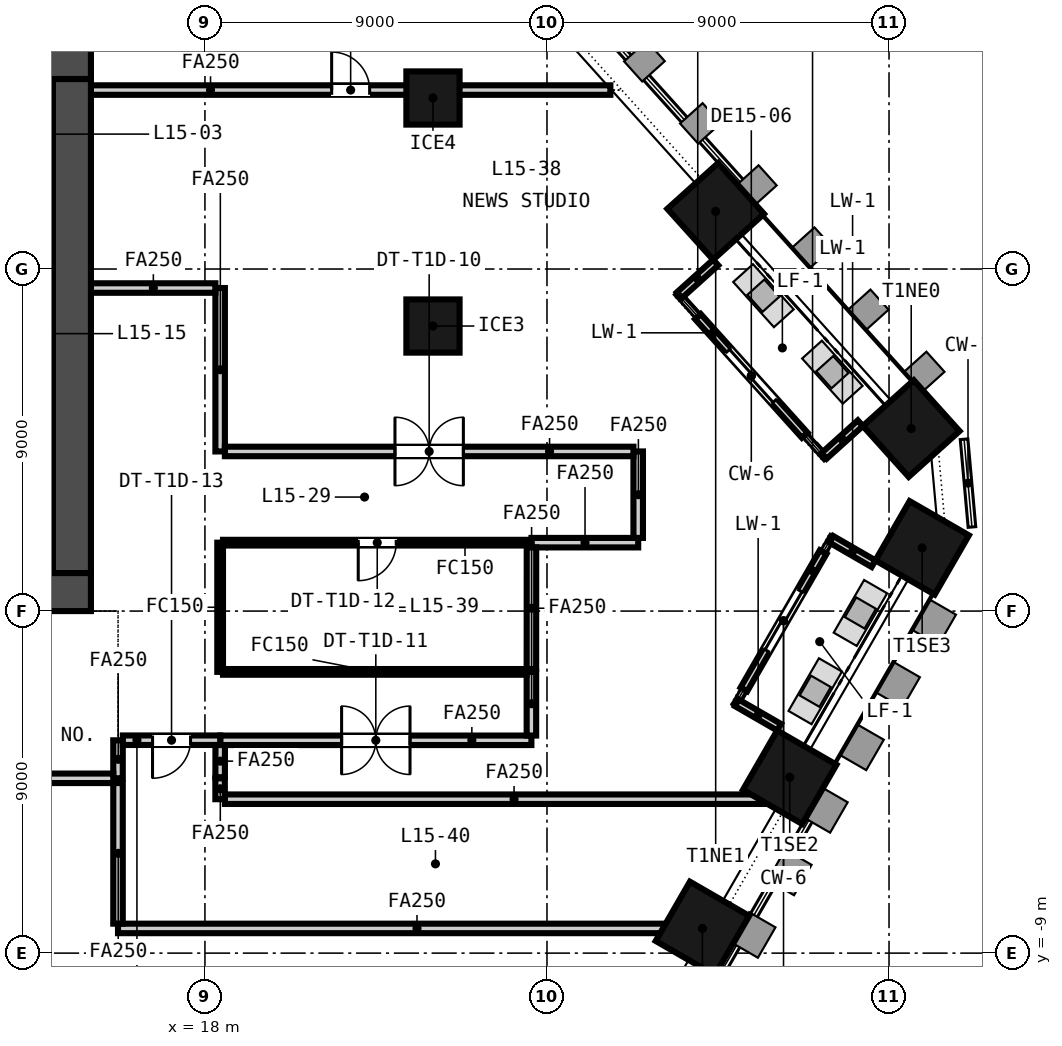
"""IFC4 building model, lengths in metres.
Left out: names, types, materials, properties, quantities, classifications, styles, units other than length and angle.
Written with IfcOpenShell. Run it as: python <this file> out.ifc"""

import sys

from ifc_helpers import new_model, si_unit, direction, frame, frame_2d, origin, origin_2d, place, context, subcontext, project, spatial, rectangle, extrude, element, fill, save


model = new_model("IFC4")
c1 = context("Model", 3, precision=1e-05, world=origin(), true_north=direction((0.0, 1.0)))
c2 = subcontext(c1, "Body", "Model", "MODEL_VIEW")
j1 = project(units=[si_unit("LENGTHUNIT", "METRE"), si_unit("PLANEANGLEUNIT", "RADIAN")], contexts=[c1])
p1 = place(None, origin())
s1 = spatial("IfcSite", under=j1, at=p1, CompositionType="ELEMENT")
p2 = place(p1, origin())
s2 = spatial("IfcBuilding", under=s1, at=p2, CompositionType="ELEMENT")
p3 = place(p2, frame((0.0, 0.0, 68.85)))
s3 = spatial("IfcBuildingStorey", under=s2, at=p3, CompositionType="ELEMENT", Elevation=68.85)
p4 = place(p3, frame((-15.0, 0.5, -0.15), z_axis=(0.0, 0.0, 1.0), x_axis=(1.0, 0.0, 0.0)))
e1 = element("IfcWall", 1, at=p4, inside=s3, PredefinedType="SOLIDWALL", context=c2, shape_type="SweptSolid", body=[
    extrude(rectangle(XDim=30.0, YDim=1.0, at=frame_2d((15.0, 0.0))), origin(), (0.0, 0.0, 1.0), 3.65),
])
p5 = place(p4, frame((5.8, 0.0, 0.15)))
e2 = element("IfcOpeningElement", 2, at=p5, cuts=e1, PredefinedType="OPENING", context=c2, shape_type="SweptSolid", body=[
    extrude(rectangle(XDim=2.4, YDim=2.4, at=frame_2d((1.2, 1.2))), frame((0.0, 0.51, 0.0), z_axis=(0.0, -1.0, 0.0), x_axis=(1.0, 0.0, 0.0)), (0.0, 0.0, 1.0), 1.02),
])
p6 = place(p4, frame((13.8, 0.0, 0.15)))
e3 = element("IfcOpeningElement", 3, at=p6, cuts=e1, PredefinedType="OPENING", context=c2, shape_type="SweptSolid", body=[
    extrude(rectangle(XDim=2.4, YDim=2.4, at=frame_2d((1.2, 1.2))), frame((0.0, 0.51, 0.0), z_axis=(0.0, -1.0, 0.0), x_axis=(1.0, 0.0, 0.0)), (0.0, 0.0, 1.0), 1.02),
])
p7 = place(p4, frame((21.8, 0.0, 0.15)))
e4 = element("IfcOpeningElement", 4, at=p7, cuts=e1, PredefinedType="OPENING", context=c2, shape_type="SweptSolid", body=[
    extrude(rectangle(XDim=2.4, YDim=2.4, at=frame_2d((1.2, 1.2))), frame((0.0, 0.51, 0.0), z_axis=(0.0, -1.0, 0.0), x_axis=(1.0, 0.0, 0.0)), (0.0, 0.0, 1.0), 1.02),
])
p8 = place(p4, frame((1.5, 0.0, 0.15)))
e5 = element("IfcOpeningElement", 5, at=p8, cuts=e1, PredefinedType="OPENING", context=c2, shape_type="SweptSolid", body=[
    extrude(rectangle(XDim=1.2, YDim=2.1, at=frame_2d((0.6, 1.05))), frame((0.0, 0.51, 0.0), z_axis=(0.0, -1.0, 0.0), x_axis=(1.0, 0.0, 0.0)), (0.0, 0.0, 1.0), 1.02),
])
p9 = place(p4, frame((27.3, 0.0, 0.15)))
e6 = element("IfcOpeningElement", 6, at=p9, cuts=e1, PredefinedType="OPENING", context=c2, shape_type="SweptSolid", body=[
    extrude(rectangle(XDim=1.2, YDim=2.1, at=frame_2d((0.6, 1.05))), frame((0.0, 0.51, 0.0), z_axis=(0.0, -1.0, 0.0), x_axis=(1.0, 0.0, 0.0)), (0.0, 0.0, 1.0), 1.02),
])
p10 = place(p3, frame((-15.0, 14.5, -0.15), z_axis=(0.0, 0.0, 1.0), x_axis=(1.0, 0.0, 0.0)))
e7 = element("IfcWall", 7, at=p10, inside=s3, PredefinedType="SOLIDWALL", context=c2, shape_type="SweptSolid", body=[
    extrude(rectangle(XDim=30.0, YDim=1.0, at=frame_2d((15.0, 0.0))), origin(), (0.0, 0.0, 1.0), 3.65),
])
p11 = place(p10, frame((9.25, 0.0, 0.15)))
e8 = element("IfcOpeningElement", 8, at=p11, cuts=e7, PredefinedType="OPENING", context=c2, shape_type="SweptSolid", body=[
    extrude(rectangle(XDim=1.5, YDim=2.1, at=frame_2d((0.75, 1.05))), frame((0.0, 0.51, 0.0), z_axis=(0.0, -1.0, 0.0), x_axis=(1.0, 0.0, 0.0)), (0.0, 0.0, 1.0), 1.02),
])
p12 = place(p10, frame((19.4, 0.0, 0.15)))
e9 = element("IfcOpeningElement", 9, at=p12, cuts=e7, PredefinedType="OPENING", context=c2, shape_type="SweptSolid", body=[
    extrude(rectangle(XDim=1.5, YDim=2.1, at=frame_2d((0.75, 1.05))), frame((0.0, 0.51, 0.0), z_axis=(0.0, -1.0, 0.0), x_axis=(1.0, 0.0, 0.0)), (0.0, 0.0, 1.0), 1.02),
])
p13 = place(p10, frame((1.5, 0.0, 0.15)))
e10 = element("IfcOpeningElement", 10, at=p13, cuts=e7, PredefinedType="OPENING", context=c2, shape_type="SweptSolid", body=[
    extrude(rectangle(XDim=1.2, YDim=2.1, at=frame_2d((0.6, 1.05))), frame((0.0, 0.51, 0.0), z_axis=(0.0, -1.0, 0.0), x_axis=(1.0, 0.0, 0.0)), (0.0, 0.0, 1.0), 1.02),
])
p14 = place(p10, frame((27.3, 0.0, 0.15)))
e11 = element("IfcOpeningElement", 11, at=p14, cuts=e7, PredefinedType="OPENING", context=c2, shape_type="SweptSolid", body=[
    extrude(rectangle(XDim=1.2, YDim=2.1, at=frame_2d((0.6, 1.05))), frame((0.0, 0.51, 0.0), z_axis=(0.0, -1.0, 0.0), x_axis=(1.0, 0.0, 0.0)), (0.0, 0.0, 1.0), 1.02),
])
p15 = place(p3, frame((14.5, 1.0, -0.15), z_axis=(0.0, 0.0, 1.0), x_axis=(0.0, 1.0, 0.0)))
e12 = element("IfcWall", 12, at=p15, inside=s3, PredefinedType="SOLIDWALL", context=c2, shape_type="SweptSolid", body=[
    extrude(rectangle(XDim=13.0, YDim=1.0, at=frame_2d((6.5, 0.0))), origin(), (0.0, 0.0, 1.0), 3.65),
])
for number, where, z_axis, x_axis in (
    (13, (31.09, -8.35, -0.15), (0.0, 0.0, 1.0), (0.5, 0.866, 0.0)),
    (14, (33.387, -4.373, -0.15), (0.0, 0.0, 1.0), (0.5, 0.866, 0.0)),
    (15, (36.872, 1.663, -0.15), (0.0, 0.0, 1.0), (0.5, 0.866, 0.0)),
    (16, (36.584, 4.803, -0.15), (0.0, 0.0, 1.0), (-0.669, 0.743, 0.0)),
    (17, (31.438, 10.517, -0.15), (0.0, 0.0, 1.0), (-0.669, 0.743, 0.0)),
):
    element("IfcColumn", number, at=place(p3, frame(where, z_axis=z_axis, x_axis=x_axis)), inside=s3, PredefinedType="COLUMN", context=c2, shape_type="SweptSolid", body=[
        extrude(rectangle(XDim=1.8, YDim=1.8, at=origin_2d()), origin(), (0.0, 0.0, 1.0), 3.65),
    ])
for number, where, z_axis, x_axis in (
    (18, (24.0, 7.5, -0.15), (0.0, 0.0, 1.0), (1.0, 0.0, 0.0)),
    (19, (24.0, 13.5, -0.15), (0.0, 0.0, 1.0), (1.0, 0.0, 0.0)),
):
    element("IfcColumn", number, at=place(p3, frame(where, z_axis=z_axis, x_axis=x_axis)), inside=s3, PredefinedType="COLUMN", context=c2, shape_type="SweptSolid", body=[
        extrude(rectangle(XDim=1.4, YDim=1.4, at=origin_2d()), origin(), (0.0, 0.0, 1.0), 3.65),
    ])
p16 = place(p3, frame((32.181, -2.06, 0.0), z_axis=(0.0, 0.0, 1.0), x_axis=(0.500043453909, 0.866000314205, 0.0)))
e20 = element("IfcWall", 20, at=p16, inside=s3, PredefinedType="SOLIDWALL", context=c2, shape_type="SweptSolid", body=[
    extrude(rectangle(XDim=4.17, YDim=0.2, at=frame_2d((2.085, 0.0))), origin(), (0.0, 0.0, 1.0), 2.821),
])
p17 = place(p16, frame((1.185, 0.0, 0.0)))
e21 = element("IfcOpeningElement", 21, at=p17, cuts=e20, PredefinedType="OPENING", context=c2, shape_type="SweptSolid", body=[
    extrude(rectangle(XDim=1.8, YDim=2.4, at=frame_2d((0.9, 1.2))), frame((0.0, 0.11, 0.0), z_axis=(0.0, -1.0, 0.0), x_axis=(1.0, 0.0, 0.0)), (0.0, 0.0, 1.0), 0.22),
])
for number, where, z_axis, x_axis in (
    (22, (33.107, -3.056, 0.0), (0.0, 0.0, 1.0), (-0.866, 0.5, 0.0)),
    (23, (35.592, 1.247, 0.0), (0.0, 0.0, 1.0), (-0.866, 0.5, 0.0)),
):
    element("IfcWall", number, at=place(p3, frame(where, z_axis=z_axis, x_axis=x_axis)), inside=s3, PredefinedType="SOLIDWALL", context=c2, shape_type="SweptSolid", body=[
        extrude(rectangle(XDim=1.284, YDim=0.2, at=frame_2d((0.642, 0.0))), origin(), (0.0, 0.0, 1.0), 3.05),
    ])
p18 = place(p3, frame((33.781, 4.627, 0.0), z_axis=(0.0, 0.0, 1.0), x_axis=(-0.669138140895, 0.743138041282, 0.0)))
e24 = element("IfcWall", 24, at=p18, inside=s3, PredefinedType="SOLIDWALL", context=c2, shape_type="SweptSolid", body=[
    extrude(rectangle(XDim=4.2, YDim=0.2, at=frame_2d((2.1, 0.0))), origin(), (0.0, 0.0, 1.0), 2.821),
])
p19 = place(p18, frame((1.2, 0.0, 0.0)))
e25 = element("IfcOpeningElement", 25, at=p19, cuts=e24, PredefinedType="OPENING", context=c2, shape_type="SweptSolid", body=[
    extrude(rectangle(XDim=1.8, YDim=2.4, at=frame_2d((0.9, 1.2))), frame((0.0, 0.11, 0.0), z_axis=(0.0, -1.0, 0.0), x_axis=(1.0, 0.0, 0.0)), (0.0, 0.0, 1.0), 0.22),
])
p20 = place(p3, frame((35.246, 4.944, 0.0), z_axis=(0.0, 0.0, 1.0), x_axis=(-0.743123928629, -0.669153813932, 0.0)))
e26 = element("IfcWall", 26, at=p20, inside=s3, PredefinedType="SOLIDWALL", context=c2, shape_type="SweptSolid", body=[
    extrude(rectangle(XDim=1.284, YDim=0.2, at=frame_2d((0.642, 0.0))), origin(), (0.0, 0.0, 1.0), 2.821),
])
p21 = place(p3, frame((31.439, 9.172, 0.0), z_axis=(0.0, 0.0, 1.0), x_axis=(-0.743123928629, -0.669153813932, 0.0)))
e27 = element("IfcWall", 27, at=p21, inside=s3, PredefinedType="SOLIDWALL", context=c2, shape_type="SweptSolid", body=[
    extrude(rectangle(XDim=1.284, YDim=0.2, at=frame_2d((0.642, 0.0))), origin(), (0.0, 0.0, 1.0), 3.05),
])
p22 = place(p3, frame((11.05, 7.35, -0.15), z_axis=(0.0, 0.0, 1.0), x_axis=(1.0, 0.0, 0.0)))
e28 = element("IfcWall", 28, at=p22, inside=s3, PredefinedType="SOLIDWALL", context=c2, shape_type="SweptSolid", body=[
    extrude(rectangle(XDim=2.95, YDim=0.3, at=frame_2d((1.475, 0.0))), origin(), (0.0, 0.0, 1.0), 3.65),
])
p23 = place(p3, frame((15.713, -3.4, 0.0), z_axis=(0.0, 0.0, 1.0), x_axis=(0.0, -1.0, 0.0)))
e29 = element("IfcWall", 29, at=p23, inside=s3, PredefinedType="PARTITIONING", context=c2, shape_type="SweptSolid", body=[
    extrude(rectangle(XDim=1.0, YDim=0.25, at=frame_2d((0.5, 0.0))), origin(), (0.0, 0.0, 1.0), 2.741),
])
p24 = place(p3, frame((15.588, -4.4, 0.0), z_axis=(0.0, 0.0, 1.0), x_axis=(-1.0, 0.0, 0.0)))
e30 = element("IfcWall", 30, at=p24, inside=s3, PredefinedType="PARTITIONING", context=c2, shape_type="SweptSolid", body=[
    extrude(rectangle(XDim=30.563, YDim=0.25, at=frame_2d((15.281, 0.0))), origin(), (0.0, 0.0, 1.0), 2.741),
])
p25 = place(p24, frame((14.394, 0.0, 0.0)))
e31 = element("IfcOpeningElement", 31, at=p25, cuts=e30, PredefinedType="OPENING", context=c2, shape_type="SweptSolid", body=[
    extrude(rectangle(XDim=1.8, YDim=2.1, at=frame_2d((0.9, 1.05))), frame((0.0, 0.135, 0.0), z_axis=(0.0, -1.0, 0.0), x_axis=(1.0, 0.0, 0.0)), (0.0, 0.0, 1.0), 0.27),
])
p26 = place(p3, frame((18.4, 8.5, 0.0), z_axis=(0.0, 0.0, 1.0), x_axis=(0.0, -1.0, 0.0)))
e32 = element("IfcWall", 32, at=p26, inside=s3, PredefinedType="PARTITIONING", context=c2, shape_type="SweptSolid", body=[
    extrude(rectangle(XDim=4.3, YDim=0.25, at=frame_2d((2.15, 0.0))), origin(), (0.0, 0.0, 1.0), 2.741),
])
p27 = place(p3, frame((26.59, -3.4, 0.0), z_axis=(0.0, 0.0, 1.0), x_axis=(-1.0, 0.0, 0.0)))
e33 = element("IfcWall", 33, at=p27, inside=s3, PredefinedType="PARTITIONING", context=c2, shape_type="SweptSolid", body=[
    extrude(rectangle(XDim=8.188, YDim=0.25, at=frame_2d((4.094, 0.0))), origin(), (0.0, 0.0, 1.0), 2.741),
])
p28 = place(p27, frame((3.194, 0.0, 0.0)))
e34 = element("IfcOpeningElement", 34, at=p28, cuts=e33, PredefinedType="OPENING", context=c2, shape_type="SweptSolid", body=[
    extrude(rectangle(XDim=1.8, YDim=2.1, at=frame_2d((0.9, 1.05))), frame((0.0, 0.135, 0.0), z_axis=(0.0, -1.0, 0.0), x_axis=(1.0, 0.0, 0.0)), (0.0, 0.0, 1.0), 0.27),
])
p29 = place(p3, frame((26.59, -1.6, 0.0), z_axis=(0.0, 0.0, 1.0), x_axis=(0.0, -1.0, 0.0)))
e35 = element("IfcWall", 35, at=p29, inside=s3, PredefinedType="PARTITIONING", context=c2, shape_type="SweptSolid", body=[
    extrude(rectangle(XDim=1.675, YDim=0.25, at=frame_2d((0.837, 0.0))), origin(), (0.0, 0.0, 1.0), 2.741),
])
p30 = place(p3, frame((29.4, 1.8, 0.0), z_axis=(0.0, 0.0, 1.0), x_axis=(-1.0, 0.0, 0.0)))
e36 = element("IfcWall", 36, at=p30, inside=s3, PredefinedType="PARTITIONING", context=c2, shape_type="SweptSolid", body=[
    extrude(rectangle(XDim=2.808, YDim=0.25, at=frame_2d((1.404, 0.0))), origin(), (0.0, 0.0, 1.0), 2.741),
])
p31 = place(p3, frame((29.4, 4.2, 0.0), z_axis=(0.0, 0.0, 1.0), x_axis=(0.0, -1.0, 0.0)))
e37 = element("IfcWall", 37, at=p31, inside=s3, PredefinedType="PARTITIONING", context=c2, shape_type="SweptSolid", body=[
    extrude(rectangle(XDim=2.275, YDim=0.25, at=frame_2d((1.137, 0.0))), origin(), (0.0, 0.0, 1.0), 2.741),
])
p32 = place(p3, frame((18.4, 1.8, 0.0), z_axis=(0.0, 0.0, 1.0), x_axis=(0.0, -1.0, 0.0)))
e38 = element("IfcWall", 38, at=p32, inside=s3, PredefinedType="PARTITIONING", context=c2, shape_type="SweptSolid", body=[
    extrude(rectangle(XDim=3.4, YDim=0.15, at=frame_2d((1.7, 0.0))), origin(), (0.0, 0.0, 1.0), 2.741),
])
p33 = place(p3, frame((26.592, 1.8, 0.0), z_axis=(0.0, 0.0, 1.0), x_axis=(-1.0, 0.0, 0.0)))
e39 = element("IfcWall", 39, at=p33, inside=s3, PredefinedType="PARTITIONING", context=c2, shape_type="SweptSolid", body=[
    extrude(rectangle(XDim=8.117, YDim=0.15, at=frame_2d((4.059, 0.0))), origin(), (0.0, 0.0, 1.0), 2.741),
])
p34 = place(p33, frame((3.559, 0.0, 0.0)))
e40 = element("IfcOpeningElement", 40, at=p34, cuts=e39, PredefinedType="OPENING", context=c2, shape_type="SweptSolid", body=[
    extrude(rectangle(XDim=1.0, YDim=2.1, at=frame_2d((0.5, 1.05))), frame((0.0, 0.085, 0.0), z_axis=(0.0, -1.0, 0.0), x_axis=(1.0, 0.0, 0.0)), (0.0, 0.0, 1.0), 0.17),
])
p35 = place(p3, frame((18.402, -3.398, 0.0), z_axis=(0.0, 0.0, 1.0), x_axis=(-1.0, 0.0, 0.0)))
e41 = element("IfcWall", 41, at=p35, inside=s3, PredefinedType="PARTITIONING", context=c2, shape_type="SweptSolid", body=[
    extrude(rectangle(XDim=2.562, YDim=0.25, at=frame_2d((1.281, 0.0))), origin(), (0.0, 0.0, 1.0), 2.741),
])
p36 = place(p35, frame((0.781, 0.0, 0.0)))
e42 = element("IfcOpeningElement", 42, at=p36, cuts=e41, PredefinedType="OPENING", context=c2, shape_type="SweptSolid", body=[
    extrude(rectangle(XDim=1.0, YDim=2.1, at=frame_2d((0.5, 1.05))), frame((0.0, 0.135, 0.0), z_axis=(0.0, -1.0, 0.0), x_axis=(1.0, 0.0, 0.0)), (0.0, 0.0, 1.0), 0.27),
])
p37 = place(p3, frame((15.0, 13.709, 0.0), z_axis=(0.0, 0.0, 1.0), x_axis=(1.0, 0.0, 0.0)))
e43 = element("IfcWall", 43, at=p37, inside=s3, PredefinedType="PARTITIONING", context=c2, shape_type="SweptSolid", body=[
    extrude(rectangle(XDim=13.668, YDim=0.25, at=frame_2d((6.834, 0.0))), origin(), (0.0, 0.0, 1.0), 2.741),
])
p38 = place(p37, frame((6.334, 0.0, 0.0)))
e44 = element("IfcOpeningElement", 44, at=p38, cuts=e43, PredefinedType="OPENING", context=c2, shape_type="SweptSolid", body=[
    extrude(rectangle(XDim=1.0, YDim=2.1, at=frame_2d((0.5, 1.05))), frame((0.0, 0.135, 0.0), z_axis=(0.0, -1.0, 0.0), x_axis=(1.0, 0.0, 0.0)), (0.0, 0.0, 1.0), 0.27),
])
p39 = place(p3, frame((15.0, 8.5, 0.0), z_axis=(0.0, 0.0, 1.0), x_axis=(1.0, 0.0, 0.0)))
e45 = element("IfcWall", 45, at=p39, inside=s3, PredefinedType="PARTITIONING", context=c2, shape_type="SweptSolid", body=[
    extrude(rectangle(XDim=3.275, YDim=0.25, at=frame_2d((1.637, 0.0))), origin(), (0.0, 0.0, 1.0), 2.741),
])
p40 = place(p3, frame((18.525, 4.2, 0.0), z_axis=(0.0, 0.0, 1.0), x_axis=(1.0, 0.0, 0.0)))
e46 = element("IfcWall", 46, at=p40, inside=s3, PredefinedType="PARTITIONING", context=c2, shape_type="SweptSolid", body=[
    extrude(rectangle(XDim=10.75, YDim=0.25, at=frame_2d((5.375, 0.0))), origin(), (0.0, 0.0, 1.0), 2.741),
])
p41 = place(p40, frame((4.475, 0.0, 0.0)))
e47 = element("IfcOpeningElement", 47, at=p41, cuts=e46, PredefinedType="OPENING", context=c2, shape_type="SweptSolid", body=[
    extrude(rectangle(XDim=1.8, YDim=2.1, at=frame_2d((0.9, 1.05))), frame((0.0, 0.135, 0.0), z_axis=(0.0, -1.0, 0.0), x_axis=(1.0, 0.0, 0.0)), (0.0, 0.0, 1.0), 0.27),
])
p42 = place(p3, frame((18.398, -4.4, 0.0), z_axis=(0.0, 0.0, 1.0), x_axis=(0.003550798743, -0.999993695894, 0.0)))
e48 = element("IfcWall", 48, at=p42, inside=s3, PredefinedType="PARTITIONING", context=c2, shape_type="SweptSolid", body=[
    extrude(rectangle(XDim=0.55, YDim=0.25, at=frame_2d((0.275, 0.0))), origin(), (0.0, 0.0, 1.0), 2.741),
])
p43 = place(p3, frame((18.525, -4.95, 0.0), z_axis=(0.0, 0.0, 1.0), x_axis=(1.0, 0.0, 0.0)))
e49 = element("IfcWall", 49, at=p43, inside=s3, PredefinedType="PARTITIONING", context=c2, shape_type="SweptSolid", body=[
    extrude(rectangle(XDim=15.208, YDim=0.25, at=frame_2d((7.604, 0.0))), origin(), (0.0, 0.0, 1.0), 2.741),
])
p44 = place(p3, frame((18.475, -1.6, 0.0), z_axis=(0.0, 0.0, 1.0), x_axis=(1.0, 0.0, 0.0)))
e50 = element("IfcWall", 50, at=p44, inside=s3, PredefinedType="PARTITIONING", context=c2, shape_type="SweptSolid", body=[
    extrude(rectangle(XDim=7.99, YDim=0.15, at=frame_2d((3.995, 0.0))), origin(), (0.0, 0.0, 1.0), 2.741),
])
p45 = place(p3, frame((26.59, -1.525, 0.0), z_axis=(0.0, 0.0, 1.0), x_axis=(0.00053406569, 0.999999857387, 0.0)))
e51 = element("IfcWall", 51, at=p45, inside=s3, PredefinedType="PARTITIONING", context=c2, shape_type="SweptSolid", body=[
    extrude(rectangle(XDim=3.2, YDim=0.25, at=frame_2d((1.6, 0.0))), origin(), (0.0, 0.0, 1.0), 2.741),
])
p46 = place(p3, frame((18.4, -4.372, 0.0), z_axis=(0.0, 0.0, 1.0), x_axis=(0.002017286962, 0.999997965275, 0.0)))
e52 = element("IfcWall", 52, at=p46, inside=s3, PredefinedType="PARTITIONING", context=c2, shape_type="SweptSolid", body=[
    extrude(rectangle(XDim=0.847, YDim=0.25, at=frame_2d((0.424, 0.0))), origin(), (0.0, 0.0, 1.0), 2.741),
])
p47 = place(p3, frame((15.713, -8.35, 0.0), z_axis=(0.0, 0.0, 1.0), x_axis=(1.0, 0.0, 0.0)))
e53 = element("IfcWall", 53, at=p47, inside=s3, PredefinedType="PARTITIONING", context=c2, shape_type="SweptSolid", body=[
    extrude(rectangle(XDim=15.724, YDim=0.25, at=frame_2d((7.862, 0.0))), origin(), (0.0, 0.0, 1.0), 2.741),
])
p48 = place(p3, frame((15.713, -4.525, 0.0), z_axis=(0.0, 0.0, 1.0), x_axis=(0.0, -1.0, 0.0)))
e54 = element("IfcWall", 54, at=p48, inside=s3, PredefinedType="PARTITIONING", context=c2, shape_type="SweptSolid", body=[
    extrude(rectangle(XDim=3.7, YDim=0.25, at=frame_2d((1.85, 0.0))), origin(), (0.0, 0.0, 1.0), 2.741),
])
p49 = place(p17, origin())
e55 = element("IfcDoor", 55, at=p49, inside=s3, OperationType="SINGLE_SWING_LEFT", PredefinedType="DOOR", context=c2, shape_type="SweptSolid", body=[
    extrude(rectangle(XDim=1.8, YDim=2.4, at=frame_2d((0.9, 1.2))), frame((0.0, 0.025, 0.0), z_axis=(0.0, -1.0, 0.0), x_axis=(1.0, 0.0, 0.0)), (0.0, 0.0, 1.0), 0.05),
])
fill(e21, e55)
p50 = place(p19, origin())
e56 = element("IfcDoor", 56, at=p50, inside=s3, OperationType="SINGLE_SWING_LEFT", PredefinedType="DOOR", context=c2, shape_type="SweptSolid", body=[
    extrude(rectangle(XDim=1.8, YDim=2.4, at=frame_2d((0.9, 1.2))), frame((0.0, 0.025, 0.0), z_axis=(0.0, -1.0, 0.0), x_axis=(1.0, 0.0, 0.0)), (0.0, 0.0, 1.0), 0.05),
])
fill(e25, e56)
p51 = place(p41, origin())
e57 = element("IfcDoor", 57, at=p51, inside=s3, OperationType="DOUBLE_DOOR_DOUBLE_SWING", PredefinedType="DOOR", context=c2, shape_type="SweptSolid", body=[
    extrude(rectangle(XDim=1.8, YDim=2.1, at=frame_2d((0.9, 1.05))), frame((0.0, 0.025, 0.0), z_axis=(0.0, -1.0, 0.0), x_axis=(1.0, 0.0, 0.0)), (0.0, 0.0, 1.0), 0.05),
])
fill(e47, e57)
p52 = place(p28, origin())
e58 = element("IfcDoor", 58, at=p52, inside=s3, OperationType="DOUBLE_DOOR_DOUBLE_SWING", PredefinedType="DOOR", context=c2, shape_type="SweptSolid", body=[
    extrude(rectangle(XDim=1.8, YDim=2.1, at=frame_2d((0.9, 1.05))), frame((0.0, 0.025, 0.0), z_axis=(0.0, -1.0, 0.0), x_axis=(1.0, 0.0, 0.0)), (0.0, 0.0, 1.0), 0.05),
])
fill(e34, e58)
p53 = place(p34, origin())
e59 = element("IfcDoor", 59, at=p53, inside=s3, OperationType="SINGLE_SWING_RIGHT", PredefinedType="DOOR", context=c2, shape_type="SweptSolid", body=[
    extrude(rectangle(XDim=1.0, YDim=2.1, at=frame_2d((0.5, 1.05))), frame((0.0, 0.025, 0.0), z_axis=(0.0, -1.0, 0.0), x_axis=(1.0, 0.0, 0.0)), (0.0, 0.0, 1.0), 0.05),
])
fill(e40, e59)
p54 = place(p36, origin())
e60 = element("IfcDoor", 60, at=p54, inside=s3, OperationType="SINGLE_SWING_RIGHT", PredefinedType="DOOR", context=c2, shape_type="SweptSolid", body=[
    extrude(rectangle(XDim=1.0, YDim=2.1, at=frame_2d((0.5, 1.05))), frame((0.0, 0.025, 0.0), z_axis=(0.0, -1.0, 0.0), x_axis=(1.0, 0.0, 0.0)), (0.0, 0.0, 1.0), 0.05),
])
fill(e42, e60)
p55 = place(p38, origin())
e61 = element("IfcDoor", 61, at=p55, inside=s3, OperationType="SINGLE_SWING_LEFT", PredefinedType="DOOR", context=c2, shape_type="SweptSolid", body=[
    extrude(rectangle(XDim=1.0, YDim=2.1, at=frame_2d((0.5, 1.05))), frame((0.0, 0.025, 0.0), z_axis=(0.0, -1.0, 0.0), x_axis=(1.0, 0.0, 0.0)), (0.0, 0.0, 1.0), 0.05),
])
fill(e44, e61)
save(model, sys.argv[1])
